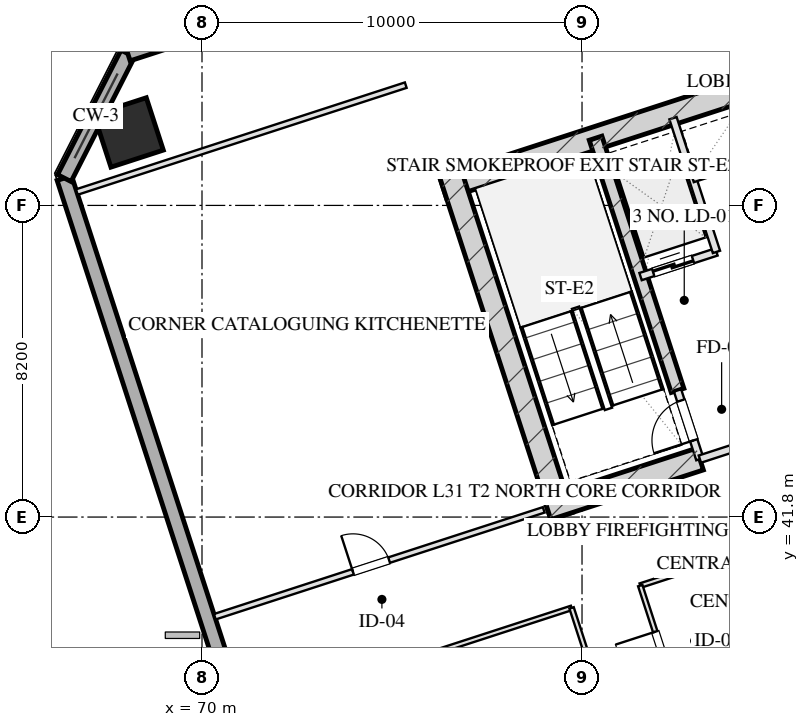
"""IFC4 building model, lengths in metres.
Left out: names, types, materials, properties, quantities, classifications, styles, units other than length and angle.
Written with IfcOpenShell. Run it as: python <this file> out.ifc"""

import sys

from ifc_helpers import new_model, si_unit, direction, frame, frame_2d, origin, origin_2d, place, context, subcontext, project, spatial, rectangle, hollow_rectangle, extrude, element, fill, save


model = new_model("IFC4")
c1 = context("Model", 3, precision=1e-05, world=origin(), true_north=direction((0.0, 1.0)))
c2 = subcontext(c1, "Body", "Model", "MODEL_VIEW")
j1 = project(units=[si_unit("LENGTHUNIT", "METRE"), si_unit("PLANEANGLEUNIT", "RADIAN")], contexts=[c1])
p1 = place(None, origin())
s1 = spatial("IfcSite", under=j1, at=p1, CompositionType="ELEMENT")
p2 = place(p1, origin())
s2 = spatial("IfcBuilding", under=s1, at=p2, CompositionType="ELEMENT")
p3 = place(p2, frame((0.0, 0.0, 120.75)))
s3 = spatial("IfcBuildingStorey", under=s2, at=p3, CompositionType="ELEMENT", Elevation=120.75)
p4 = place(p3, frame((76.344, 50.466, 0.0), z_axis=(0.0, 0.0, 1.0), x_axis=(0.951055727519, 0.309019421968, 0.0)))
e1 = element("IfcWall", 1, at=p4, inside=s3, PredefinedType="SHEAR", context=c2, shape_type="SweptSolid", body=[
    extrude(rectangle(XDim=16.4, YDim=0.6, at=frame_2d((8.2, 0.0))), origin(), (0.0, 0.0, 1.0), 3.45),
])
p5 = place(p3, frame((79.466, 41.828, 0.0), z_axis=(0.0, 0.0, 1.0), x_axis=(-0.309041232772, 0.951048640421, 0.0)))
e2 = element("IfcWall", 2, at=p5, inside=s3, PredefinedType="SHEAR", context=c2, shape_type="SweptSolid", body=[
    extrude(rectangle(XDim=9.48, YDim=0.6, at=frame_2d((4.74, 0.0))), origin(), (0.0, 0.0, 1.0), 3.45),
])
p6 = place(p3, frame((82.514, 45.131, 0.0), z_axis=(0.0, 0.0, 1.0), x_axis=(-0.308988790936, 0.951065679686, 0.0)))
e3 = element("IfcWall", 3, at=p6, inside=s3, PredefinedType="SHEAR", context=c2, shape_type="SweptSolid", body=[
    extrude(rectangle(XDim=6.98, YDim=0.35, at=frame_2d((3.49, 0.0))), origin(), (0.0, 0.0, 1.0), 3.45),
])
p7 = place(p3, frame((79.087, 42.021, 0.0), z_axis=(0.0, 0.0, 1.0), x_axis=(0.951062550203, 0.3089984233, 0.0)))
e4 = element("IfcWall", 4, at=p7, inside=s3, PredefinedType="SHEAR", context=c2, shape_type="SweptSolid", body=[
    extrude(rectangle(XDim=4.22, YDim=0.6, at=frame_2d((2.11, 0.0))), origin(), (0.0, 0.0, 1.0), 3.45),
])
p8 = place(p3, frame((68.069, 51.92, 0.0), z_axis=(0.0, 0.0, 1.0), x_axis=(0.951056516295, 0.309016994375, 0.0)))
e5 = element("IfcColumn", 5, at=p8, inside=s3, PredefinedType="COLUMN", context=c2, shape_type="SweptSolid", body=[
    extrude(hollow_rectangle(XDim=1.45, YDim=1.45, WallThickness=0.05, at=origin_2d()), origin(), (0.0, 0.0, 1.0), 3.451),
])
p9 = place(p3, frame((80.716, 6.59, 0.0), z_axis=(0.0, 0.0, 1.0), x_axis=(-0.309017542002, 0.95105633836, 0.0)))
e6 = element("IfcWall", 6, at=p9, inside=s3, PredefinedType="SOLIDWALL", context=c2, shape_type="SweptSolid", body=[
    extrude(rectangle(XDim=46.4, YDim=0.4, at=frame_2d((23.2, 0.0))), origin(), (0.0, 0.0, 1.0), 2.61),
])
p10 = place(p9, frame((15.6, 0.0, 0.75)))
e7 = element("IfcOpeningElement", 7, at=p10, cuts=e6, PredefinedType="OPENING", context=c2, shape_type="SweptSolid", body=[
    extrude(rectangle(XDim=2.4, YDim=1.46, at=frame_2d((1.2, 0.73))), frame((0.0, 0.21, 0.0), z_axis=(0.0, -1.0, 0.0), x_axis=(1.0, 0.0, 0.0)), (0.0, 0.0, 1.0), 0.42),
])
p11 = place(p9, frame((28.45, 0.0, 0.0)))
e8 = element("IfcOpeningElement", 8, at=p11, cuts=e6, PredefinedType="OPENING", context=c2, shape_type="SweptSolid", body=[
    extrude(rectangle(XDim=1.1, YDim=2.15, at=frame_2d((0.55, 1.075))), frame((0.0, 0.21, 0.0), z_axis=(0.0, -1.0, 0.0), x_axis=(1.0, 0.0, 0.0)), (0.0, 0.0, 1.0), 0.42),
])
p12 = place(p3, frame((66.377, 50.719, 0.0), z_axis=(0.0, 0.0, 1.0), x_axis=(0.454026238093, 0.890988313685, 0.0)))
e9 = element("IfcWall", 9, at=p12, inside=s3, PredefinedType="SOLIDWALL", context=c2, shape_type="SweptSolid", body=[
    extrude(rectangle(XDim=3.677, YDim=0.4, at=frame_2d((1.838, 0.0))), origin(), (0.0, 0.0, 1.0), 2.61),
])
p13 = place(p3, frame((68.047, 53.995, 0.0), z_axis=(0.0, 0.0, 1.0), x_axis=(0.95105505922, 0.309021478754, 0.0)))
e10 = element("IfcWall", 10, at=p13, inside=s3, PredefinedType="SOLIDWALL", context=c2, shape_type="SweptSolid", body=[
    extrude(rectangle(XDim=29.4, YDim=0.4, at=frame_2d((14.7, 0.0))), origin(), (0.0, 0.0, 1.0), 2.61),
])
p14 = place(p3, frame((83.101, 43.324, 0.0), z_axis=(0.0, 0.0, 1.0), x_axis=(-0.309048298632, 0.951046344356, 0.0)))
e11 = element("IfcWall", 11, at=p14, inside=s3, PredefinedType="PARTITIONING", context=c2, shape_type="SweptSolid", body=[
    extrude(rectangle(XDim=1.9, YDim=0.2, at=frame_2d((0.95, 0.0))), origin(), (0.0, 0.0, 1.0), 3.175),
])
p15 = place(p14, frame((0.52, 0.0, 0.0)))
e12 = element("IfcOpeningElement", 12, at=p15, cuts=e11, PredefinedType="OPENING", context=c2, shape_type="SweptSolid", body=[
    extrude(rectangle(XDim=1.1, YDim=2.05, at=frame_2d((0.55, 1.025))), frame((0.0, 0.11, 0.0), z_axis=(0.0, -1.0, 0.0), x_axis=(1.0, 0.0, 0.0)), (0.0, 0.0, 1.0), 0.22),
])
p16 = place(p3, frame((83.101, 43.324, 0.0), z_axis=(0.0, 0.0, 1.0), x_axis=(0.951052804469, 0.309028417967, 0.0)))
e13 = element("IfcWall", 13, at=p16, inside=s3, PredefinedType="PARTITIONING", context=c2, shape_type="SweptSolid", body=[
    extrude(rectangle(XDim=3.83, YDim=0.2, at=frame_2d((1.915, 0.0))), origin(), (0.0, 0.0, 1.0), 3.175),
])
p17 = place(p16, frame((1.35, 0.0, 0.0)))
e14 = element("IfcOpeningElement", 14, at=p17, cuts=e13, PredefinedType="OPENING", context=c2, shape_type="SweptSolid", body=[
    extrude(rectangle(XDim=1.2, YDim=2.05, at=frame_2d((0.6, 1.025))), frame((0.0, 0.11, 0.0), z_axis=(0.0, -1.0, 0.0), x_axis=(1.0, 0.0, 0.0)), (0.0, 0.0, 1.0), 0.22),
])
p18 = place(p3, frame((81.54, 48.127, 0.0), z_axis=(0.0, 0.0, 1.0), x_axis=(0.951062257173, 0.308999325213, 0.0)))
e15 = element("IfcWall", 15, at=p18, inside=s3, PredefinedType="PARTITIONING", context=c2, shape_type="SweptSolid", body=[
    extrude(rectangle(XDim=2.1, YDim=0.2, at=frame_2d((1.05, 0.0))), origin(), (0.0, 0.0, 1.0), 3.175),
])
p19 = place(p18, frame((0.35, 0.0, 0.0)))
e16 = element("IfcOpeningElement", 16, at=p19, cuts=e15, PredefinedType="OPENING", context=c2, shape_type="SweptSolid", body=[
    extrude(rectangle(XDim=1.1, YDim=2.05, at=frame_2d((0.55, 1.025))), frame((0.0, 0.11, 0.0), z_axis=(0.0, -1.0, 0.0), x_axis=(1.0, 0.0, 0.0)), (0.0, 0.0, 1.0), 0.22),
])
p20 = place(p3, frame((83.538, 48.776, 0.0), z_axis=(0.0, 0.0, 1.0), x_axis=(-0.3089935693, 0.951064127245, 0.0)))
e17 = element("IfcWall", 17, at=p20, inside=s3, PredefinedType="PARTITIONING", context=c2, shape_type="SweptSolid", body=[
    extrude(rectangle(XDim=3.7, YDim=0.2, at=frame_2d((1.85, 0.0))), origin(), (0.0, 0.0, 1.0), 3.175),
])
p21 = place(p3, frame((82.91, 50.707, 0.0), z_axis=(0.0, 0.0, 1.0), x_axis=(0.951041328149, 0.309063734775, 0.0)))
e18 = element("IfcWall", 18, at=p21, inside=s3, PredefinedType="PARTITIONING", context=c2, shape_type="SweptSolid", body=[
    extrude(rectangle(XDim=1.73, YDim=0.2, at=frame_2d((0.865, 0.0))), origin(), (0.0, 0.0, 1.0), 3.175),
])
p22 = place(p3, frame((66.707, 50.352, 0.0), z_axis=(0.0, 0.0, 1.0), x_axis=(0.951057133767, 0.309015093986, 0.0)))
e19 = element("IfcWall", 19, at=p22, inside=s3, PredefinedType="PARTITIONING", context=c2, shape_type="SweptSolid", body=[
    extrude(rectangle(XDim=9.1, YDim=0.15, at=frame_2d((4.55, 0.0))), origin(), (0.0, 0.0, 1.0), 3.175),
])
p23 = place(p3, frame((70.338, 39.177, 0.0), z_axis=(0.0, 0.0, 1.0), x_axis=(0.951059695568, 0.309007209409, 0.0)))
e20 = element("IfcWall", 20, at=p23, inside=s3, PredefinedType="PARTITIONING", context=c2, shape_type="SweptSolid", body=[
    extrude(rectangle(XDim=9.1, YDim=0.15, at=frame_2d((4.55, 0.0))), origin(), (0.0, 0.0, 1.0), 3.175),
])
p24 = place(p23, frame((3.822, 0.0, 0.0)))
e21 = element("IfcOpeningElement", 21, at=p24, cuts=e20, PredefinedType="OPENING", context=c2, shape_type="SweptSolid", body=[
    extrude(rectangle(XDim=1.0, YDim=2.05, at=frame_2d((0.5, 1.025))), frame((0.0, 0.085, 0.0), z_axis=(0.0, -1.0, 0.0), x_axis=(1.0, 0.0, 0.0)), (0.0, 0.0, 1.0), 0.17),
])
p25 = place(p3, frame((71.166, 36.629, 0.0), z_axis=(0.0, 0.0, 1.0), x_axis=(0.951059383421, 0.309008170129, 0.0)))
e22 = element("IfcWall", 22, at=p25, inside=s3, PredefinedType="PARTITIONING", context=c2, shape_type="SweptSolid", body=[
    extrude(rectangle(XDim=9.0, YDim=0.12, at=frame_2d((4.5, 0.0))), origin(), (0.0, 0.0, 1.0), 3.175),
])
p26 = place(p3, frame((81.532, 39.997, 0.0), z_axis=(0.0, 0.0, 1.0), x_axis=(0.951048148493, 0.309042746635, 0.0)))
e23 = element("IfcWall", 23, at=p26, inside=s3, PredefinedType="PARTITIONING", context=c2, shape_type="SweptSolid", body=[
    extrude(rectangle(XDim=7.9, YDim=0.12, at=frame_2d((3.95, 0.0))), origin(), (0.0, 0.0, 1.0), 3.175),
])
p27 = place(p3, frame((84.867, 23.584, 0.0), z_axis=(0.0, 0.0, 1.0), x_axis=(-0.309022042254, 0.951054876125, 0.0)))
e24 = element("IfcWall", 24, at=p27, inside=s3, PredefinedType="PARTITIONING", context=c2, shape_type="SweptSolid", body=[
    extrude(rectangle(XDim=16.64, YDim=0.12, at=frame_2d((8.32, 0.0))), origin(), (0.0, 0.0, 1.0), 3.175),
])
p28 = place(p27, frame((3.06, 0.0, 0.0)))
e25 = element("IfcOpeningElement", 25, at=p28, cuts=e24, PredefinedType="OPENING", context=c2, shape_type="SweptSolid", body=[
    extrude(rectangle(XDim=1.0, YDim=2.05, at=frame_2d((0.5, 1.025))), frame((0.0, 0.07, 0.0), z_axis=(0.0, -1.0, 0.0), x_axis=(1.0, 0.0, 0.0)), (0.0, 0.0, 1.0), 0.14),
])
p29 = place(p27, frame((9.22, 0.0, 0.0)))
e26 = element("IfcOpeningElement", 26, at=p29, cuts=e24, PredefinedType="OPENING", context=c2, shape_type="SweptSolid", body=[
    extrude(rectangle(XDim=1.0, YDim=2.05, at=frame_2d((0.5, 1.025))), frame((0.0, 0.07, 0.0), z_axis=(0.0, -1.0, 0.0), x_axis=(1.0, 0.0, 0.0)), (0.0, 0.0, 1.0), 0.14),
])
p30 = place(p27, frame((13.98, 0.0, 0.0)))
e27 = element("IfcOpeningElement", 27, at=p30, cuts=e24, PredefinedType="OPENING", context=c2, shape_type="SweptSolid", body=[
    extrude(rectangle(XDim=1.0, YDim=2.05, at=frame_2d((0.5, 1.025))), frame((0.0, 0.07, 0.0), z_axis=(0.0, -1.0, 0.0), x_axis=(1.0, 0.0, 0.0)), (0.0, 0.0, 1.0), 0.14),
])
p31 = place(p3, frame((86.675, 24.171, 0.0), z_axis=(0.0, 0.0, 1.0), x_axis=(-0.309022042254, 0.951054876125, 0.0)))
e28 = element("IfcWall", 28, at=p31, inside=s3, PredefinedType="PARTITIONING", context=c2, shape_type="SweptSolid", body=[
    extrude(rectangle(XDim=16.64, YDim=0.12, at=frame_2d((8.32, 0.0))), origin(), (0.0, 0.0, 1.0), 3.175),
])
p32 = place(p31, frame((3.204, 0.0, 0.0)))
e29 = element("IfcOpeningElement", 29, at=p32, cuts=e28, PredefinedType="OPENING", context=c2, shape_type="SweptSolid", body=[
    extrude(rectangle(XDim=1.1, YDim=2.05, at=frame_2d((0.55, 1.025))), frame((0.0, 0.07, 0.0), z_axis=(0.0, -1.0, 0.0), x_axis=(1.0, 0.0, 0.0)), (0.0, 0.0, 1.0), 0.14),
])
p33 = place(p31, frame((14.264, 0.0, 0.0)))
e30 = element("IfcOpeningElement", 30, at=p33, cuts=e28, PredefinedType="OPENING", context=c2, shape_type="SweptSolid", body=[
    extrude(rectangle(XDim=1.1, YDim=2.05, at=frame_2d((0.55, 1.025))), frame((0.0, 0.07, 0.0), z_axis=(0.0, -1.0, 0.0), x_axis=(1.0, 0.0, 0.0)), (0.0, 0.0, 1.0), 0.14),
])
p34 = place(p3, frame((82.867, 35.888, 0.0), z_axis=(0.0, 0.0, 1.0), x_axis=(0.951057231385, 0.309014793547, 0.0)))
e31 = element("IfcWall", 31, at=p34, inside=s3, PredefinedType="PARTITIONING", context=c2, shape_type="SweptSolid", body=[
    extrude(rectangle(XDim=7.9, YDim=0.12, at=frame_2d((3.95, 0.0))), origin(), (0.0, 0.0, 1.0), 3.175),
])
p35 = place(p15, origin())
e32 = element("IfcDoor", 32, at=p35, inside=s3, OperationType="SINGLE_SWING_LEFT", PredefinedType="DOOR", context=c2, shape_type="SweptSolid", body=[
    extrude(rectangle(XDim=1.1, YDim=2.05, at=frame_2d((0.55, 1.025))), frame((0.0, 0.025, 0.0), z_axis=(0.0, -1.0, 0.0), x_axis=(1.0, 0.0, 0.0)), (0.0, 0.0, 1.0), 0.05),
])
fill(e12, e32)
p36 = place(p19, origin())
e33 = element("IfcDoor", 33, at=p36, inside=s3, OperationType="DOUBLE_DOOR_SLIDING", PredefinedType="DOOR", context=c2, shape_type="SweptSolid", body=[
    extrude(rectangle(XDim=1.1, YDim=2.05, at=frame_2d((0.55, 1.025))), frame((0.0, 0.025, 0.0), z_axis=(0.0, -1.0, 0.0), x_axis=(1.0, 0.0, 0.0)), (0.0, 0.0, 1.0), 0.05),
])
fill(e16, e33)
p37 = place(p24, origin())
e34 = element("IfcDoor", 34, at=p37, inside=s3, OperationType="SINGLE_SWING_LEFT", PredefinedType="DOOR", context=c2, shape_type="SweptSolid", body=[
    extrude(rectangle(XDim=1.0, YDim=2.05, at=frame_2d((0.5, 1.025))), frame((0.0, 0.025, 0.0), z_axis=(0.0, -1.0, 0.0), x_axis=(1.0, 0.0, 0.0)), (0.0, 0.0, 1.0), 0.05),
])
fill(e21, e34)
p38 = place(p33, origin())
e35 = element("IfcDoor", 35, at=p38, inside=s3, OperationType="SINGLE_SWING_RIGHT", PredefinedType="DOOR", context=c2, shape_type="SweptSolid", body=[
    extrude(rectangle(XDim=1.1, YDim=2.05, at=frame_2d((0.55, 1.025))), frame((0.0, 0.025, 0.0), z_axis=(0.0, -1.0, 0.0), x_axis=(1.0, 0.0, 0.0)), (0.0, 0.0, 1.0), 0.05),
])
fill(e30, e35)
save(model, sys.argv[1])
